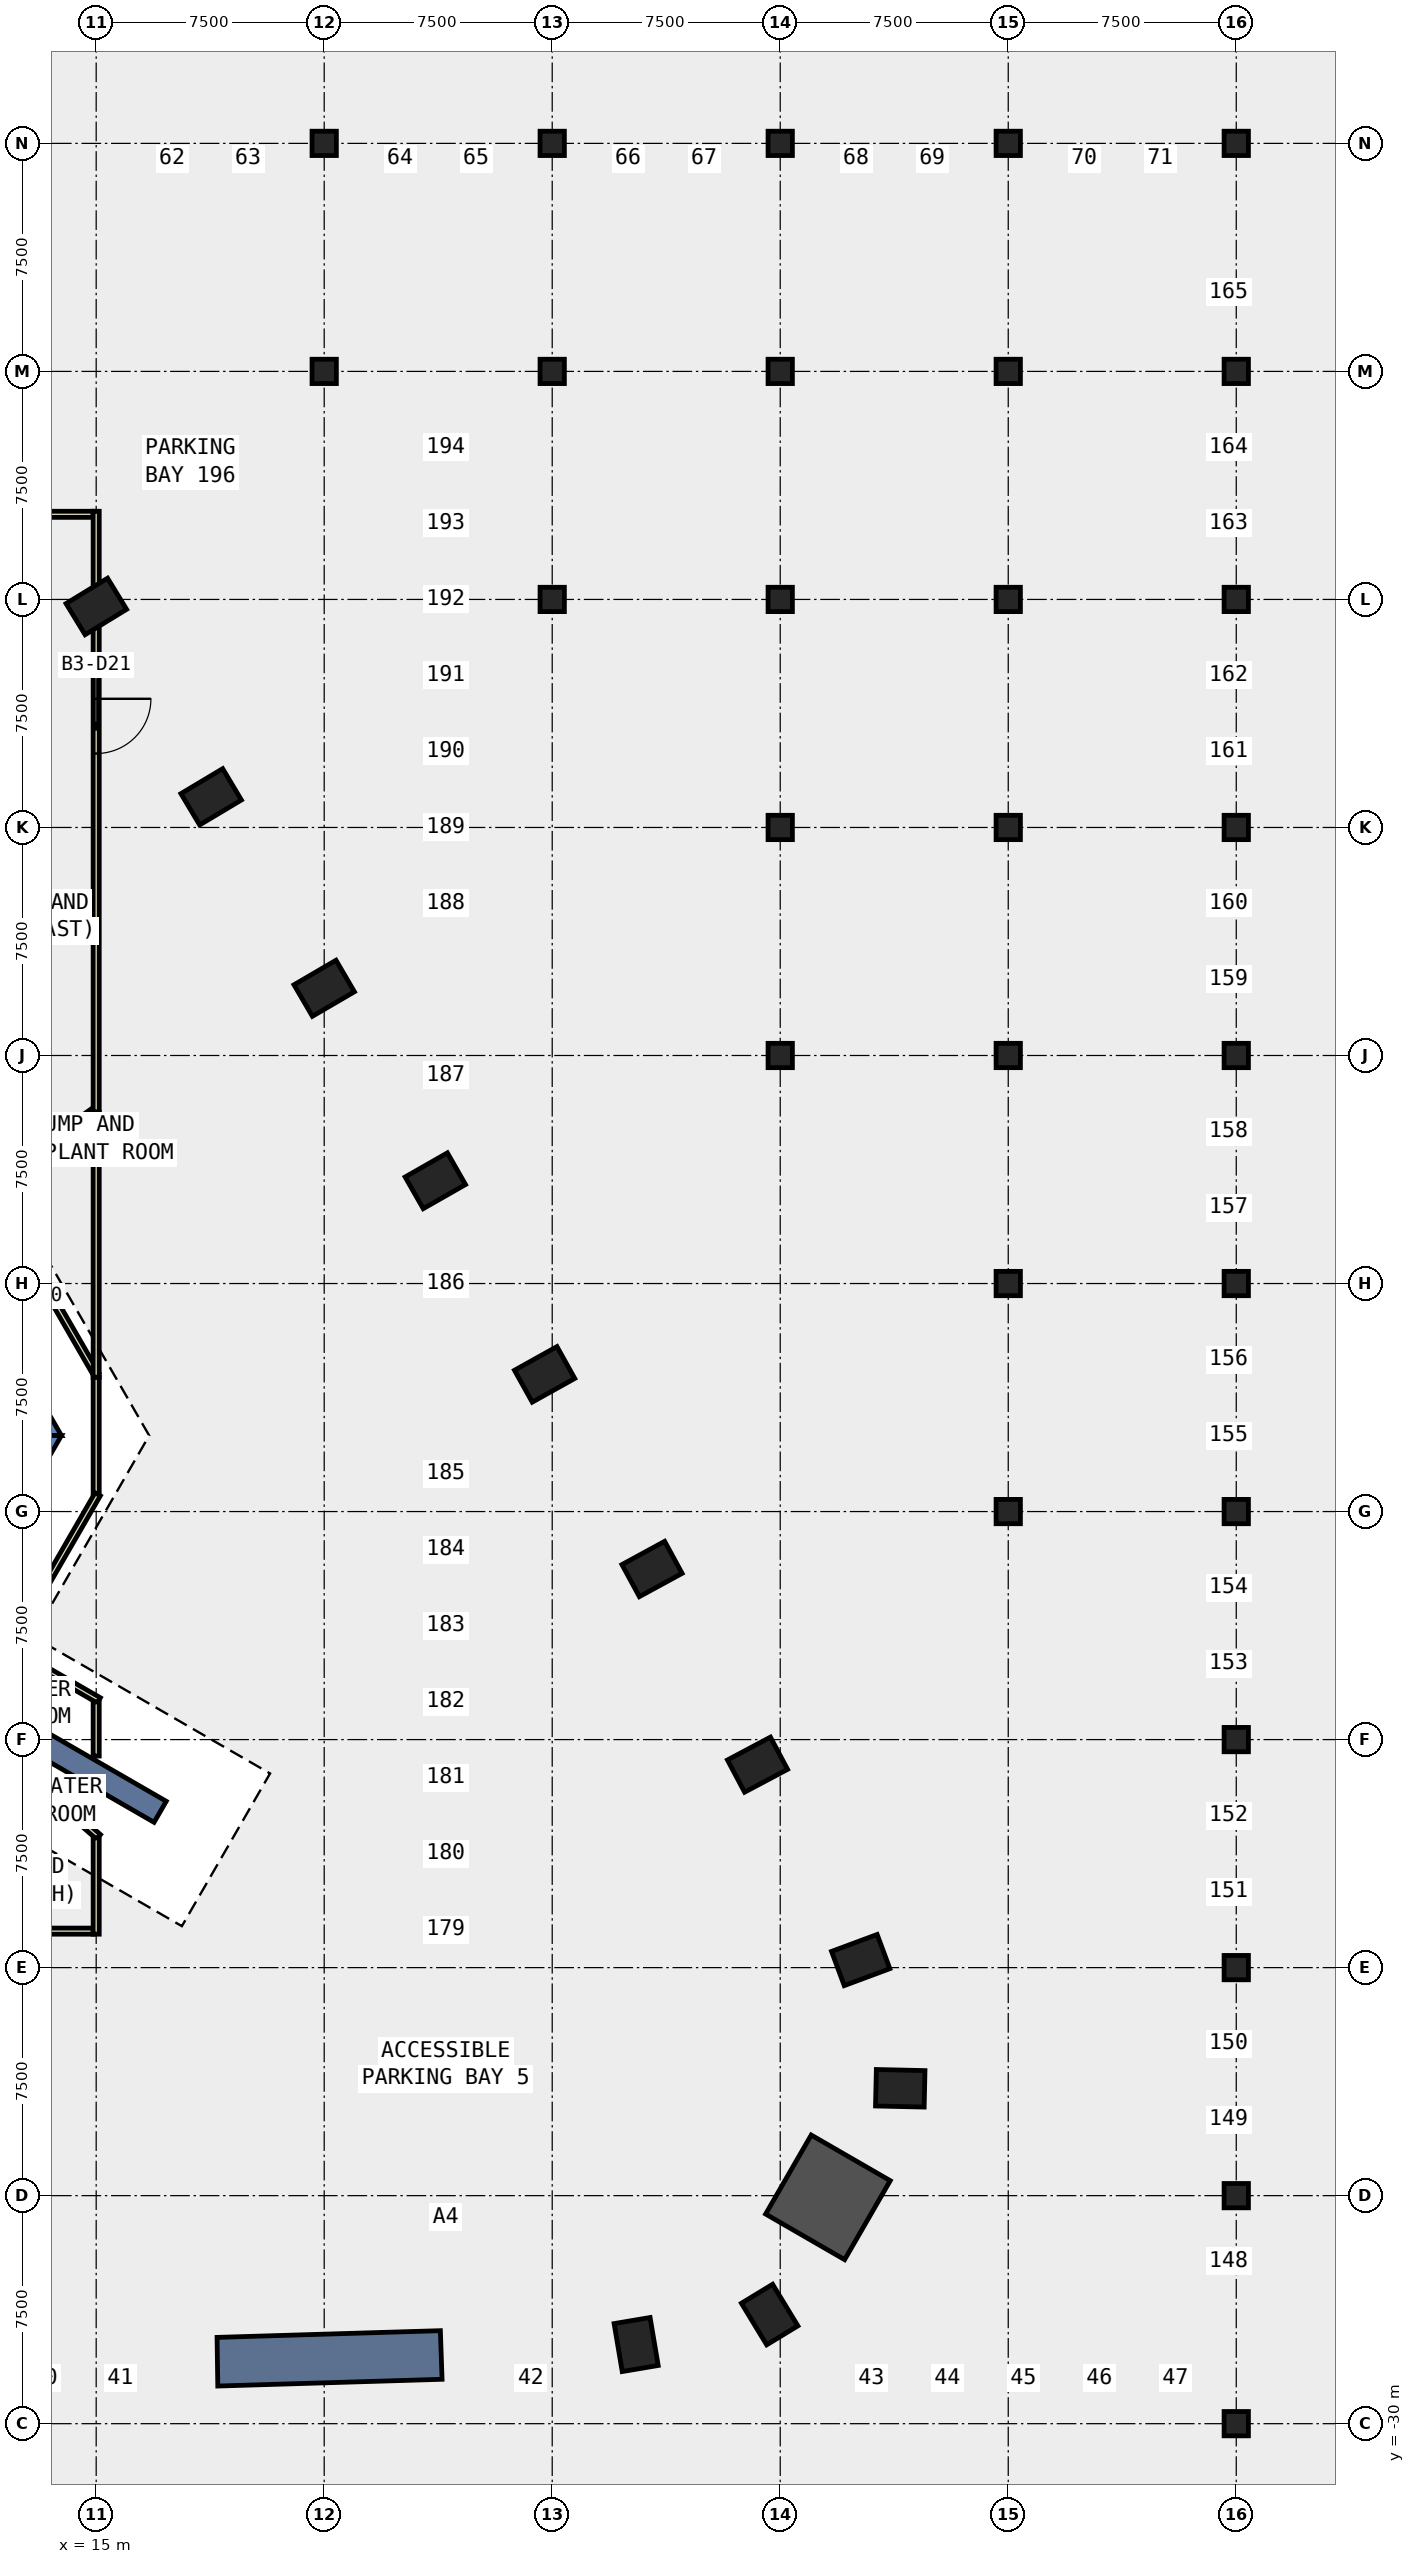
"""IFC4 building model, lengths in metres.
Left out: names, types, materials, properties, quantities, classifications, styles, units other than length and angle.
Written with IfcOpenShell. Run it as: python <this file> out.ifc"""

import sys

from ifc_helpers import new_model, si_unit, direction, frame, frame_2d, origin, origin_2d, place, context, subcontext, project, spatial, polyline, rectangle, outline, extrude, element, fill, save


model = new_model("IFC4")
c1 = context("Model", 3, precision=1e-05, world=origin(), true_north=direction((0.0, 1.0)))
c2 = subcontext(c1, "Body", "Model", "MODEL_VIEW")
j1 = project(units=[si_unit("LENGTHUNIT", "METRE"), si_unit("PLANEANGLEUNIT", "RADIAN")], contexts=[c1])
p1 = place(None, origin())
s1 = spatial("IfcSite", under=j1, at=p1, CompositionType="ELEMENT")
p2 = place(p1, origin())
s2 = spatial("IfcBuilding", under=s1, at=p2, CompositionType="ELEMENT")
p3 = place(p2, frame((0.0, 0.0, -16.5)))
s3 = spatial("IfcBuildingStorey", under=s2, at=p3, CompositionType="ELEMENT", Elevation=-16.5)
for number, where, z_axis, x_axis in (
    (1, (22.5, 37.5, -0.4), (0.0, 0.0, 1.0), (1.0, 0.0, 0.0)),
    (2, (22.5, 45.0, -0.4), (0.0, 0.0, 1.0), (1.0, 0.0, 0.0)),
    (3, (30.0, 30.0, -0.4), (0.0, 0.0, 1.0), (1.0, 0.0, 0.0)),
    (4, (30.0, 37.5, -0.4), (0.0, 0.0, 1.0), (1.0, 0.0, 0.0)),
    (5, (30.0, 45.0, -0.4), (0.0, 0.0, 1.0), (1.0, 0.0, 0.0)),
    (6, (37.5, 15.0, -0.4), (0.0, 0.0, 1.0), (1.0, 0.0, 0.0)),
    (7, (37.5, 22.5, -0.4), (0.0, 0.0, 1.0), (1.0, 0.0, 0.0)),
    (8, (37.5, 30.0, -0.4), (0.0, 0.0, 1.0), (1.0, 0.0, 0.0)),
    (9, (37.5, 37.5, -0.4), (0.0, 0.0, 1.0), (1.0, 0.0, 0.0)),
    (10, (37.5, 45.0, -0.4), (0.0, 0.0, 1.0), (1.0, 0.0, 0.0)),
    (11, (45.0, 0.0, -0.4), (0.0, 0.0, 1.0), (1.0, 0.0, 0.0)),
    (12, (45.0, 7.5, -0.4), (0.0, 0.0, 1.0), (1.0, 0.0, 0.0)),
    (13, (45.0, 15.0, -0.4), (0.0, 0.0, 1.0), (1.0, 0.0, 0.0)),
    (14, (45.0, 22.5, -0.4), (0.0, 0.0, 1.0), (1.0, 0.0, 0.0)),
    (15, (45.0, 30.0, -0.4), (0.0, 0.0, 1.0), (1.0, 0.0, 0.0)),
    (16, (45.0, 37.5, -0.4), (0.0, 0.0, 1.0), (1.0, 0.0, 0.0)),
    (17, (45.0, 45.0, -0.4), (0.0, 0.0, 1.0), (1.0, 0.0, 0.0)),
    (18, (52.5, -30.0, -0.4), (0.0, 0.0, 1.0), (1.0, 0.0, 0.0)),
    (19, (52.5, -22.5, -0.4), (0.0, 0.0, 1.0), (1.0, 0.0, 0.0)),
    (20, (52.5, -15.0, -0.4), (0.0, 0.0, 1.0), (1.0, 0.0, 0.0)),
    (21, (52.5, -7.5, -0.4), (0.0, 0.0, 1.0), (1.0, 0.0, 0.0)),
    (22, (52.5, 0.0, -0.4), (0.0, 0.0, 1.0), (1.0, 0.0, 0.0)),
    (23, (52.5, 7.5, -0.4), (0.0, 0.0, 1.0), (1.0, 0.0, 0.0)),
    (24, (52.5, 15.0, -0.4), (0.0, 0.0, 1.0), (1.0, 0.0, 0.0)),
    (25, (52.5, 22.5, -0.4), (0.0, 0.0, 1.0), (1.0, 0.0, 0.0)),
    (26, (52.5, 30.0, -0.4), (0.0, 0.0, 1.0), (1.0, 0.0, 0.0)),
    (27, (52.5, 37.5, -0.4), (0.0, 0.0, 1.0), (1.0, 0.0, 0.0)),
    (28, (52.5, 45.0, -0.4), (0.0, 0.0, 1.0), (1.0, 0.0, 0.0)),
):
    element("IfcColumn", number, at=place(p3, frame(where, z_axis=z_axis, x_axis=x_axis)), inside=s3, PredefinedType="COLUMN", context=c2, shape_type="SweptSolid", body=[
        extrude(rectangle(XDim=0.8, YDim=0.8, at=origin_2d()), origin(), (0.0, 0.0, 1.0), 5.48),
    ])
for number, where, z_axis, x_axis in (
    (29, (32.761, -27.397, -0.4), (0.0, 0.0, 1.0), (0.986, 0.167, 0.0)),
    (30, (37.152, -26.411, -0.4), (0.0, 0.0, 1.0), (0.855, 0.519, 0.0)),
):
    element("IfcColumn", number, at=place(p3, frame(where, z_axis=z_axis, x_axis=x_axis)), inside=s3, PredefinedType="COLUMN", context=c2, shape_type="SweptSolid", body=[
        extrude(rectangle(XDim=1.2, YDim=1.6, at=origin_2d()), origin(), (0.0, 0.0, 1.0), 5.48),
    ])
p4 = place(p3, frame((39.069, -22.556, -0.4), z_axis=(0.0, 0.0, 1.0), x_axis=(-0.866025403784, 0.5, 0.0)))
e31 = element("IfcColumn", 31, at=p4, inside=s3, PredefinedType="COLUMN", context=c2, shape_type="SweptSolid", body=[
    extrude(rectangle(XDim=3.0, YDim=3.0, at=origin_2d()), origin(), (0.0, 0.0, 1.0), 5.48),
])
for number, where, z_axis, x_axis in (
    (32, (41.448, -18.969, -0.4), (0.0, 0.0, 1.0), (0.023, 1.0, 0.0)),
    (33, (40.147, -14.751, -0.4), (0.0, 0.0, 1.0), (-0.348, 0.937, 0.0)),
    (34, (36.753, -8.325, -0.4), (0.0, 0.0, 1.0), (-0.469, 0.883, 0.0)),
    (35, (33.283, -1.889, -0.4), (0.0, 0.0, 1.0), (-0.478, 0.878, 0.0)),
    (36, (29.75, 4.512, -0.4), (0.0, 0.0, 1.0), (-0.487, 0.873, 0.0)),
    (37, (26.155, 10.88, -0.4), (0.0, 0.0, 1.0), (-0.496, 0.869, 0.0)),
    (38, (22.5, 17.211, -0.4), (0.0, 0.0, 1.0), (-0.504, 0.864, 0.0)),
    (39, (18.782, 23.508, -0.4), (0.0, 0.0, 1.0), (-0.513, 0.858, 0.0)),
    (40, (15.005, 29.769, -0.4), (0.0, 0.0, 1.0), (-0.522, 0.853, 0.0)),
):
    element("IfcColumn", number, at=place(p3, frame(where, z_axis=z_axis, x_axis=x_axis)), inside=s3, PredefinedType="COLUMN", context=c2, shape_type="SweptSolid", body=[
        extrude(rectangle(XDim=1.2, YDim=1.6, at=origin_2d()), origin(), (0.0, 0.0, 1.0), 5.48),
    ])
p5 = place(p3, frame((0.0, 0.0, -0.4)))
e41 = element("IfcWall", 41, at=p5, inside=s3, PredefinedType="SHEAR", context=c2, shape_type="SweptSolid", body=[
    extrude(outline(polyline([(19.0, -28.762), (26.377, -28.54), (26.321, -26.941), (18.976, -27.162), (19.0, -28.762)])), origin(), (0.0, 0.0, 1.0), 5.48),
])
p6 = place(p3, origin())
e42 = element("IfcWall", 42, at=p6, inside=s3, PredefinedType="SHEAR", context=c2, shape_type="SweptSolid", body=[
    extrude(outline(polyline([(8.517, 11.748), (7.651, 11.248), (12.702, 2.5), (13.856, 2.5), (8.517, 11.748)])), origin(), (0.0, 0.0, 1.0), 5.08),
])
p7 = place(p3, origin())
e43 = element("IfcWall", 43, at=p7, inside=s3, PredefinedType="SHEAR", context=c2, shape_type="SweptSolid", body=[
    extrude(outline(polyline([(6.928, -9.5), (13.856, 2.5), (12.702, 2.5), (6.351, -8.5), (6.928, -9.5)])), origin(), (0.0, 0.0, 1.0), 5.08),
])
p8 = place(p3, frame((9.31, -5.375, 0.0), z_axis=(0.0, 0.0, 1.0), x_axis=(0.866017533419, -0.500013631625, 0.0)))
e44 = element("IfcWall", 44, at=p8, inside=s3, PredefinedType="SHEAR", context=c2, shape_type="SweptSolid", body=[
    extrude(rectangle(XDim=9.0, YDim=0.8, at=frame_2d((4.5, 0.0))), origin(), (0.0, 0.0, 1.0), 5.08),
])
p9 = place(p3, frame((14.9, -13.8, 0.0), z_axis=(0.0, 0.0, 1.0), x_axis=(-1.0, 0.0, 0.0)))
e45 = element("IfcWall", 45, at=p9, inside=s3, PredefinedType="PARTITIONING", context=c2, shape_type="SweptSolid", body=[
    extrude(rectangle(XDim=2.249, YDim=0.2, at=frame_2d((1.125, 0.0))), origin(), (0.0, 0.0, 1.0), 5.08),
])
p10 = place(p3, frame((10.663, -6.835, 0.0), z_axis=(0.0, 0.0, 1.0), x_axis=(0.752269740493, -0.658855247788, 0.0)))
e46 = element("IfcWall", 46, at=p10, inside=s3, PredefinedType="PARTITIONING", context=c2, shape_type="SweptSolid", body=[
    extrude(rectangle(XDim=5.865, YDim=0.2, at=frame_2d((2.932, 0.0))), origin(), (0.0, 0.0, 1.0), 5.08),
])
p11 = place(p3, frame((15.0, -10.733, 0.0), z_axis=(0.0, 0.0, 1.0), x_axis=(0.0, -1.0, 0.0)))
e47 = element("IfcWall", 47, at=p11, inside=s3, PredefinedType="PARTITIONING", context=c2, shape_type="SweptSolid", body=[
    extrude(rectangle(XDim=3.167, YDim=0.2, at=frame_2d((1.583, 0.0))), origin(), (0.0, 0.0, 1.0), 5.08),
])
p12 = place(p3, frame((12.124, -4.5, 0.0), z_axis=(0.0, 0.0, 1.0), x_axis=(0.866109535743, -0.499854250852, 0.0)))
e48 = element("IfcWall", 48, at=p12, inside=s3, PredefinedType="PARTITIONING", context=c2, shape_type="SweptSolid", body=[
    extrude(rectangle(XDim=3.421, YDim=0.2, at=frame_2d((1.71, 0.0))), origin(), (0.0, 0.0, 1.0), 5.08),
])
p13 = place(p3, frame((15.0, -6.26, 0.0), z_axis=(0.0, 0.0, 1.0), x_axis=(0.0, -1.0, 0.0)))
e49 = element("IfcWall", 49, at=p13, inside=s3, PredefinedType="PARTITIONING", context=c2, shape_type="SweptSolid", body=[
    extrude(rectangle(XDim=1.781, YDim=0.2, at=frame_2d((0.891, 0.0))), origin(), (0.0, 0.0, 1.0), 5.08),
])
p14 = place(p3, frame((11.499, 10.583, 0.0), z_axis=(0.0, 0.0, 1.0), x_axis=(0.499994090379, -0.866028815679, 0.0)))
e50 = element("IfcWall", 50, at=p14, inside=s3, PredefinedType="PARTITIONING", context=c2, shape_type="SweptSolid", body=[
    extrude(rectangle(XDim=7.002, YDim=0.2, at=frame_2d((3.501, 0.0))), origin(), (0.0, 0.0, 1.0), 5.08),
])
p15 = place(p14, frame((1.952, 0.0, 0.0)))
e51 = element("IfcOpeningElement", 51, at=p15, cuts=e50, PredefinedType="OPENING", context=c2, shape_type="SweptSolid", body=[
    extrude(rectangle(XDim=1.0, YDim=2.1, at=frame_2d((0.5, 1.05))), frame((0.0, 0.11, 0.0), z_axis=(0.0, -1.0, 0.0), x_axis=(1.0, 0.0, 0.0)), (0.0, 0.0, 1.0), 0.22),
])
p16 = place(p3, frame((15.0, 4.419, 0.0), z_axis=(0.0, 0.0, 1.0), x_axis=(0.0, -1.0, 0.0)))
e52 = element("IfcWall", 52, at=p16, inside=s3, PredefinedType="PARTITIONING", context=c2, shape_type="SweptSolid", body=[
    extrude(rectangle(XDim=3.838, YDim=0.2, at=frame_2d((1.919, 0.0))), origin(), (0.0, 0.0, 1.0), 5.08),
])
p17 = place(p3, frame((15.05, 0.568, 0.0), z_axis=(0.0, 0.0, 1.0), x_axis=(-0.500047946832, -0.865997719899, 0.0)))
e53 = element("IfcWall", 53, at=p17, inside=s3, PredefinedType="PARTITIONING", context=c2, shape_type="SweptSolid", body=[
    extrude(rectangle(XDim=5.952, YDim=0.2, at=frame_2d((2.976, 0.0))), origin(), (0.0, 0.0, 1.0), 5.08),
])
p18 = place(p3, frame((14.919, 13.18, 0.0), z_axis=(0.0, 0.0, 1.0), x_axis=(-0.81313339858, -0.582077379833, 0.0)))
e54 = element("IfcWall", 54, at=p18, inside=s3, PredefinedType="PARTITIONING", context=c2, shape_type="SweptSolid", body=[
    extrude(rectangle(XDim=3.879, YDim=0.2, at=frame_2d((1.939, 0.0))), origin(), (0.0, 0.0, 1.0), 5.08),
])
p19 = place(p3, frame((12.59, 32.8, 0.0), z_axis=(0.0, 0.0, 1.0), x_axis=(1.0, 0.0, 0.0)))
e55 = element("IfcWall", 55, at=p19, inside=s3, PredefinedType="PARTITIONING", context=c2, shape_type="SweptSolid", body=[
    extrude(rectangle(XDim=2.31, YDim=0.2, at=frame_2d((1.155, 0.0))), origin(), (0.0, 0.0, 1.0), 5.08),
])
p20 = place(p3, frame((15.0, 32.9, 0.0), z_axis=(0.0, 0.0, 1.0), x_axis=(0.0, -1.0, 0.0)))
e56 = element("IfcWall", 56, at=p20, inside=s3, PredefinedType="PARTITIONING", context=c2, shape_type="SweptSolid", body=[
    extrude(rectangle(XDim=19.762, YDim=0.2, at=frame_2d((9.881, 0.0))), origin(), (0.0, 0.0, 1.0), 5.08),
])
p21 = place(p20, frame((6.168, 0.0, 0.0)))
e57 = element("IfcOpeningElement", 57, at=p21, cuts=e56, PredefinedType="OPENING", context=c2, shape_type="SweptSolid", body=[
    extrude(rectangle(XDim=1.8, YDim=2.1, at=frame_2d((0.9, 1.05))), frame((0.0, 0.11, 0.0), z_axis=(0.0, -1.0, 0.0), x_axis=(1.0, 0.0, 0.0)), (0.0, 0.0, 1.0), 0.22),
])
p22 = place(p3, frame((15.0, 13.138, 0.0), z_axis=(0.0, 0.0, 1.0), x_axis=(0.0, -1.0, 0.0)))
e58 = element("IfcWall", 58, at=p22, inside=s3, PredefinedType="PARTITIONING", context=c2, shape_type="SweptSolid", body=[
    extrude(rectangle(XDim=8.719, YDim=0.2, at=frame_2d((4.359, 0.0))), origin(), (0.0, 0.0, 1.0), 5.08),
])
p23 = place(p21, origin())
e59 = element("IfcDoor", 59, at=p23, inside=s3, OperationType="DOUBLE_DOOR_SINGLE_SWING", PredefinedType="DOOR", context=c2, shape_type="SweptSolid", body=[
    extrude(rectangle(XDim=1.8, YDim=2.1, at=frame_2d((0.9, 1.05))), frame((0.0, 0.025, 0.0), z_axis=(0.0, -1.0, 0.0), x_axis=(1.0, 0.0, 0.0)), (0.0, 0.0, 1.0), 0.05),
])
fill(e57, e59)
save(model, sys.argv[1])
